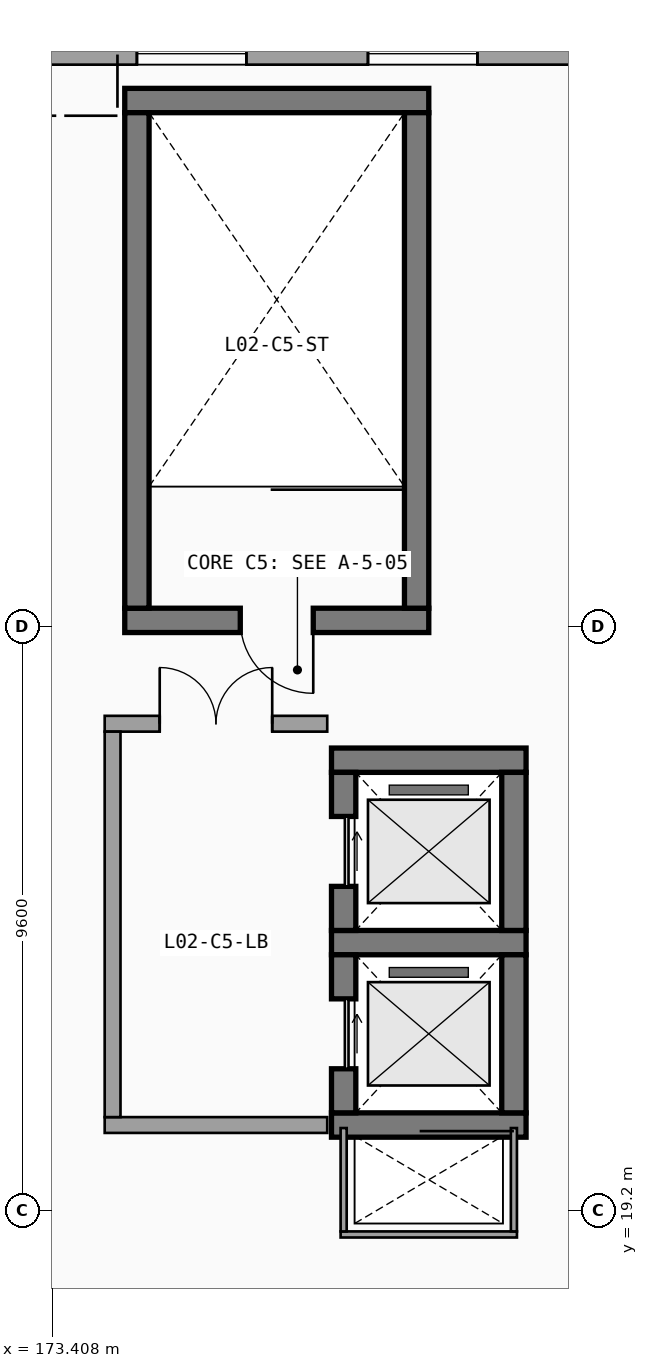
"""IFC4 building model, lengths in metres.
Left out: names, types, materials, properties, quantities, classifications, styles, units other than length and angle.
Written with IfcOpenShell. Run it as: python <this file> out.ifc"""

import sys

from ifc_helpers import new_model, si_unit, direction, frame, frame_2d, origin, place, context, subcontext, project, spatial, rectangle, extrude, element, fill, save


model = new_model("IFC4")
c1 = context("Model", 3, precision=1e-05, world=origin(), true_north=direction((0.0, 1.0)))
c2 = subcontext(c1, "Body", "Model", "MODEL_VIEW")
j1 = project(units=[si_unit("LENGTHUNIT", "METRE"), si_unit("PLANEANGLEUNIT", "RADIAN")], contexts=[c1])
p1 = place(None, origin())
s1 = spatial("IfcSite", under=j1, at=p1, CompositionType="ELEMENT")
p2 = place(p1, origin())
s2 = spatial("IfcBuilding", under=s1, at=p2, CompositionType="ELEMENT")
p3 = place(p2, frame((0.0, 0.0, 9.6)))
s3 = spatial("IfcBuildingStorey", under=s2, at=p3, CompositionType="ELEMENT", Elevation=9.6)
p4 = place(p3, frame((182.4, 38.22, 0.0), z_axis=(0.0, 0.0, 1.0), x_axis=(-1.0, 0.0, 0.0)))
e1 = element("IfcWall", 1, at=p4, inside=s3, PredefinedType="SOLIDWALL", context=c2, shape_type="SweptSolid", body=[
    extrude(rectangle(XDim=9.6, YDim=0.36, at=frame_2d((4.8, 0.0))), origin(), (0.0, 0.0, 1.0), 3.466),
])
p5 = place(p4, frame((3.8, 0.0, 0.9), z_axis=(0.0, 0.0, 1.0), x_axis=(-1.0, 0.0, 0.0)))
e2 = element("IfcOpeningElement", 2, at=p5, cuts=e1, PredefinedType="OPENING", context=c2, shape_type="SweptSolid", body=[
    extrude(rectangle(XDim=1.8, YDim=2.2, at=frame_2d((0.9, 1.1))), frame((0.0, 0.19, 0.0), z_axis=(0.0, -1.0, 0.0), x_axis=(1.0, 0.0, 0.0)), (0.0, 0.0, 1.0), 0.38),
])
p6 = place(p4, frame((7.6, 0.0, 0.9), z_axis=(0.0, 0.0, 1.0), x_axis=(-1.0, 0.0, 0.0)))
e3 = element("IfcOpeningElement", 3, at=p6, cuts=e1, PredefinedType="OPENING", context=c2, shape_type="SweptSolid", body=[
    extrude(rectangle(XDim=1.8, YDim=2.2, at=frame_2d((0.9, 1.1))), frame((0.0, 0.19, 0.0), z_axis=(0.0, -1.0, 0.0), x_axis=(1.0, 0.0, 0.0)), (0.0, 0.0, 1.0), 0.38),
])
p7 = place(p3, frame((174.6, 28.9, 0.0), z_axis=(0.0, 0.0, 1.0), x_axis=(1.0, 0.0, 0.0)))
e4 = element("IfcWall", 4, at=p7, inside=s3, PredefinedType="SHEAR", context=c2, shape_type="SweptSolid", body=[
    extrude(rectangle(XDim=5.0, YDim=0.4, at=frame_2d((2.5, 0.0))), origin(), (0.0, 0.0, 1.0), 4.22),
])
p8 = place(p7, frame((3.1, 0.0, 0.0), z_axis=(0.0, 0.0, 1.0), x_axis=(-1.0, 0.0, 0.0)))
e5 = element("IfcOpeningElement", 5, at=p8, cuts=e4, PredefinedType="OPENING", context=c2, shape_type="SweptSolid", body=[
    extrude(rectangle(XDim=1.2, YDim=2.2, at=frame_2d((0.6, 1.1))), frame((0.0, 0.21, 0.0), z_axis=(0.0, -1.0, 0.0), x_axis=(1.0, 0.0, 0.0)), (0.0, 0.0, 1.0), 0.42),
])
p9 = place(p3, frame((179.6, 37.45, 0.0), z_axis=(0.0, 0.0, 1.0), x_axis=(-1.0, 0.0, 0.0)))
e6 = element("IfcWall", 6, at=p9, inside=s3, PredefinedType="SHEAR", context=c2, shape_type="SweptSolid", body=[
    extrude(rectangle(XDim=5.0, YDim=0.4, at=frame_2d((2.5, 0.0))), origin(), (0.0, 0.0, 1.0), 4.22),
])
for number, where, z_axis, x_axis in (
    (7, (174.8, 37.25, 0.0), (0.0, 0.0, 1.0), (0.0, -1.0, 0.0)),
    (8, (179.4, 29.1, 0.0), (0.0, 0.0, 1.0), (0.0, 1.0, 0.0)),
):
    element("IfcWall", number, at=place(p3, frame(where, z_axis=z_axis, x_axis=x_axis)), inside=s3, PredefinedType="SHEAR", context=c2, shape_type="SweptSolid", body=[
        extrude(rectangle(XDim=8.15, YDim=0.4, at=frame_2d((4.075, 0.0))), origin(), (0.0, 0.0, 1.0), 4.22),
    ])
for number, where, z_axis, x_axis in (
    (9, (178.0, 20.6, 0.0), (0.0, 0.0, 1.0), (1.0, 0.0, 0.0)),
    (10, (181.2, 23.6, 0.0), (0.0, 0.0, 1.0), (-1.0, 0.0, 0.0)),
):
    element("IfcWall", number, at=place(p3, frame(where, z_axis=z_axis, x_axis=x_axis)), inside=s3, PredefinedType="SHEAR", context=c2, shape_type="SweptSolid", body=[
        extrude(rectangle(XDim=3.2, YDim=0.4, at=frame_2d((1.6, 0.0))), origin(), (0.0, 0.0, 1.0), 4.22),
    ])
p10 = place(p3, frame((178.2, 23.4, 0.0), z_axis=(0.0, 0.0, 1.0), x_axis=(0.0, -1.0, 0.0)))
e11 = element("IfcWall", 11, at=p10, inside=s3, PredefinedType="SHEAR", context=c2, shape_type="SweptSolid", body=[
    extrude(rectangle(XDim=2.6, YDim=0.4, at=frame_2d((1.3, 0.0))), origin(), (0.0, 0.0, 1.0), 4.22),
])
p11 = place(p10, frame((0.725, 0.0, 0.0), z_axis=(0.0, 0.0, 1.0), x_axis=(1.0, 0.0, 0.0)))
e12 = element("IfcOpeningElement", 12, at=p11, cuts=e11, PredefinedType="OPENING", context=c2, shape_type="SweptSolid", body=[
    extrude(rectangle(XDim=1.15, YDim=2.2, at=frame_2d((0.575, 1.1))), frame((0.0, 0.21, 0.0), z_axis=(0.0, -1.0, 0.0), x_axis=(1.0, 0.0, 0.0)), (0.0, 0.0, 1.0), 0.42),
])
p12 = place(p3, frame((181.0, 20.8, 0.0), z_axis=(0.0, 0.0, 1.0), x_axis=(0.0, 1.0, 0.0)))
e13 = element("IfcWall", 13, at=p12, inside=s3, PredefinedType="SHEAR", context=c2, shape_type="SweptSolid", body=[
    extrude(rectangle(XDim=2.6, YDim=0.4, at=frame_2d((1.3, 0.0))), origin(), (0.0, 0.0, 1.0), 4.22),
])
p13 = place(p3, frame((181.2, 26.6, 0.0), z_axis=(0.0, 0.0, 1.0), x_axis=(-1.0, 0.0, 0.0)))
e14 = element("IfcWall", 14, at=p13, inside=s3, PredefinedType="SHEAR", context=c2, shape_type="SweptSolid", body=[
    extrude(rectangle(XDim=3.2, YDim=0.4, at=frame_2d((1.6, 0.0))), origin(), (0.0, 0.0, 1.0), 4.22),
])
p14 = place(p3, frame((178.2, 26.4, 0.0), z_axis=(0.0, 0.0, 1.0), x_axis=(0.0, -1.0, 0.0)))
e15 = element("IfcWall", 15, at=p14, inside=s3, PredefinedType="SHEAR", context=c2, shape_type="SweptSolid", body=[
    extrude(rectangle(XDim=2.6, YDim=0.4, at=frame_2d((1.3, 0.0))), origin(), (0.0, 0.0, 1.0), 4.22),
])
p15 = place(p14, frame((0.725, 0.0, 0.0), z_axis=(0.0, 0.0, 1.0), x_axis=(1.0, 0.0, 0.0)))
e16 = element("IfcOpeningElement", 16, at=p15, cuts=e15, PredefinedType="OPENING", context=c2, shape_type="SweptSolid", body=[
    extrude(rectangle(XDim=1.15, YDim=2.2, at=frame_2d((0.575, 1.1))), frame((0.0, 0.21, 0.0), z_axis=(0.0, -1.0, 0.0), x_axis=(1.0, 0.0, 0.0)), (0.0, 0.0, 1.0), 0.42),
])
p16 = place(p3, frame((181.0, 23.8, 0.0), z_axis=(0.0, 0.0, 1.0), x_axis=(0.0, 1.0, 0.0)))
e17 = element("IfcWall", 17, at=p16, inside=s3, PredefinedType="SHEAR", context=c2, shape_type="SweptSolid", body=[
    extrude(rectangle(XDim=2.6, YDim=0.4, at=frame_2d((1.3, 0.0))), origin(), (0.0, 0.0, 1.0), 4.22),
])
p17 = place(p3, frame((178.15, 18.8, 0.0), z_axis=(0.0, 0.0, 1.0), x_axis=(1.0, 0.0, 0.0)))
e18 = element("IfcWall", 18, at=p17, inside=s3, PredefinedType="PARTITIONING", context=c2, shape_type="SweptSolid", body=[
    extrude(rectangle(XDim=2.9, YDim=0.1, at=frame_2d((1.45, 0.0))), origin(), (0.0, 0.0, 1.0), 4.22),
])
for number, where, z_axis, x_axis in (
    (19, (178.2, 20.55, 0.0), (0.0, 0.0, 1.0), (0.0, -1.0, 0.0)),
    (20, (181.0, 18.85, 0.0), (0.0, 0.0, 1.0), (0.0, 1.0, 0.0)),
):
    element("IfcWall", number, at=place(p3, frame(where, z_axis=z_axis, x_axis=x_axis)), inside=s3, PredefinedType="PARTITIONING", context=c2, shape_type="SweptSolid", body=[
        extrude(rectangle(XDim=1.7, YDim=0.1, at=frame_2d((0.85, 0.0))), origin(), (0.0, 0.0, 1.0), 4.22),
    ])
p18 = place(p3, frame((174.27, 20.6, 0.0), z_axis=(0.0, 0.0, 1.0), x_axis=(1.0, 0.0, 0.0)))
e21 = element("IfcWall", 21, at=p18, inside=s3, PredefinedType="SOLIDWALL", context=c2, shape_type="SweptSolid", body=[
    extrude(rectangle(XDim=3.66, YDim=0.26, at=frame_2d((1.83, 0.0))), origin(), (0.0, 0.0, 1.0), 4.22),
])
p19 = place(p3, frame((177.93, 27.2, 0.0), z_axis=(0.0, 0.0, 1.0), x_axis=(-1.0, 0.0, 0.0)))
e22 = element("IfcWall", 22, at=p19, inside=s3, PredefinedType="SOLIDWALL", context=c2, shape_type="SweptSolid", body=[
    extrude(rectangle(XDim=3.66, YDim=0.26, at=frame_2d((1.83, 0.0))), origin(), (0.0, 0.0, 1.0), 4.22),
])
p20 = place(p19, frame((2.755, 0.0, 0.0), z_axis=(0.0, 0.0, 1.0), x_axis=(-1.0, 0.0, 0.0)))
e23 = element("IfcOpeningElement", 23, at=p20, cuts=e22, PredefinedType="OPENING", context=c2, shape_type="SweptSolid", body=[
    extrude(rectangle(XDim=1.85, YDim=2.25, at=frame_2d((0.925, 1.125))), frame((0.0, 0.14, 0.0), z_axis=(0.0, -1.0, 0.0), x_axis=(1.0, 0.0, 0.0)), (0.0, 0.0, 1.0), 0.28),
])
p21 = place(p3, frame((174.4, 27.07, 0.0), z_axis=(0.0, 0.0, 1.0), x_axis=(0.0, -1.0, 0.0)))
e24 = element("IfcWall", 24, at=p21, inside=s3, PredefinedType="SOLIDWALL", context=c2, shape_type="SweptSolid", body=[
    extrude(rectangle(XDim=6.34, YDim=0.26, at=frame_2d((3.17, 0.0))), origin(), (0.0, 0.0, 1.0), 4.22),
])
p22 = place(p5, origin())
e25 = element("IfcWindow", 25, at=p22, inside=s3, PartitioningType="SINGLE_PANEL", PredefinedType="WINDOW", context=c2, shape_type="SweptSolid", body=[
    extrude(rectangle(XDim=1.8, YDim=2.2, at=frame_2d((0.9, 1.1))), frame((0.0, 0.03, 0.0), z_axis=(0.0, -1.0, 0.0), x_axis=(1.0, 0.0, 0.0)), (0.0, 0.0, 1.0), 0.06),
])
fill(e2, e25)
p23 = place(p6, origin())
e26 = element("IfcWindow", 26, at=p23, inside=s3, PartitioningType="SINGLE_PANEL", PredefinedType="WINDOW", context=c2, shape_type="SweptSolid", body=[
    extrude(rectangle(XDim=1.8, YDim=2.2, at=frame_2d((0.9, 1.1))), frame((0.0, 0.03, 0.0), z_axis=(0.0, -1.0, 0.0), x_axis=(1.0, 0.0, 0.0)), (0.0, 0.0, 1.0), 0.06),
])
fill(e3, e26)
p24 = place(p8, origin())
e27 = element("IfcDoor", 27, at=p24, inside=s3, OperationType="SINGLE_SWING_LEFT", PredefinedType="DOOR", context=c2, shape_type="SweptSolid", body=[
    extrude(rectangle(XDim=1.2, YDim=2.2, at=frame_2d((0.6, 1.1))), frame((0.0, 0.025, 0.0), z_axis=(0.0, -1.0, 0.0), x_axis=(1.0, 0.0, 0.0)), (0.0, 0.0, 1.0), 0.05),
])
fill(e5, e27)
p25 = place(p11, origin())
e28 = element("IfcDoor", 28, at=p25, inside=s3, OperationType="SLIDING_TO_LEFT", PredefinedType="DOOR", context=c2, shape_type="SweptSolid", body=[
    extrude(rectangle(XDim=1.15, YDim=2.2, at=frame_2d((0.575, 1.1))), frame((0.0, 0.025, 0.0), z_axis=(0.0, -1.0, 0.0), x_axis=(1.0, 0.0, 0.0)), (0.0, 0.0, 1.0), 0.05),
])
fill(e12, e28)
p26 = place(p15, origin())
e29 = element("IfcDoor", 29, at=p26, inside=s3, OperationType="SLIDING_TO_LEFT", PredefinedType="DOOR", context=c2, shape_type="SweptSolid", body=[
    extrude(rectangle(XDim=1.15, YDim=2.2, at=frame_2d((0.575, 1.1))), frame((0.0, 0.025, 0.0), z_axis=(0.0, -1.0, 0.0), x_axis=(1.0, 0.0, 0.0)), (0.0, 0.0, 1.0), 0.05),
])
fill(e16, e29)
p27 = place(p20, origin())
e30 = element("IfcDoor", 30, at=p27, inside=s3, OperationType="DOUBLE_DOOR_SINGLE_SWING", PredefinedType="DOOR", context=c2, shape_type="SweptSolid", body=[
    extrude(rectangle(XDim=1.85, YDim=2.25, at=frame_2d((0.925, 1.125))), frame((0.0, 0.025, 0.0), z_axis=(0.0, -1.0, 0.0), x_axis=(1.0, 0.0, 0.0)), (0.0, 0.0, 1.0), 0.05),
])
fill(e23, e30)
save(model, sys.argv[1])
